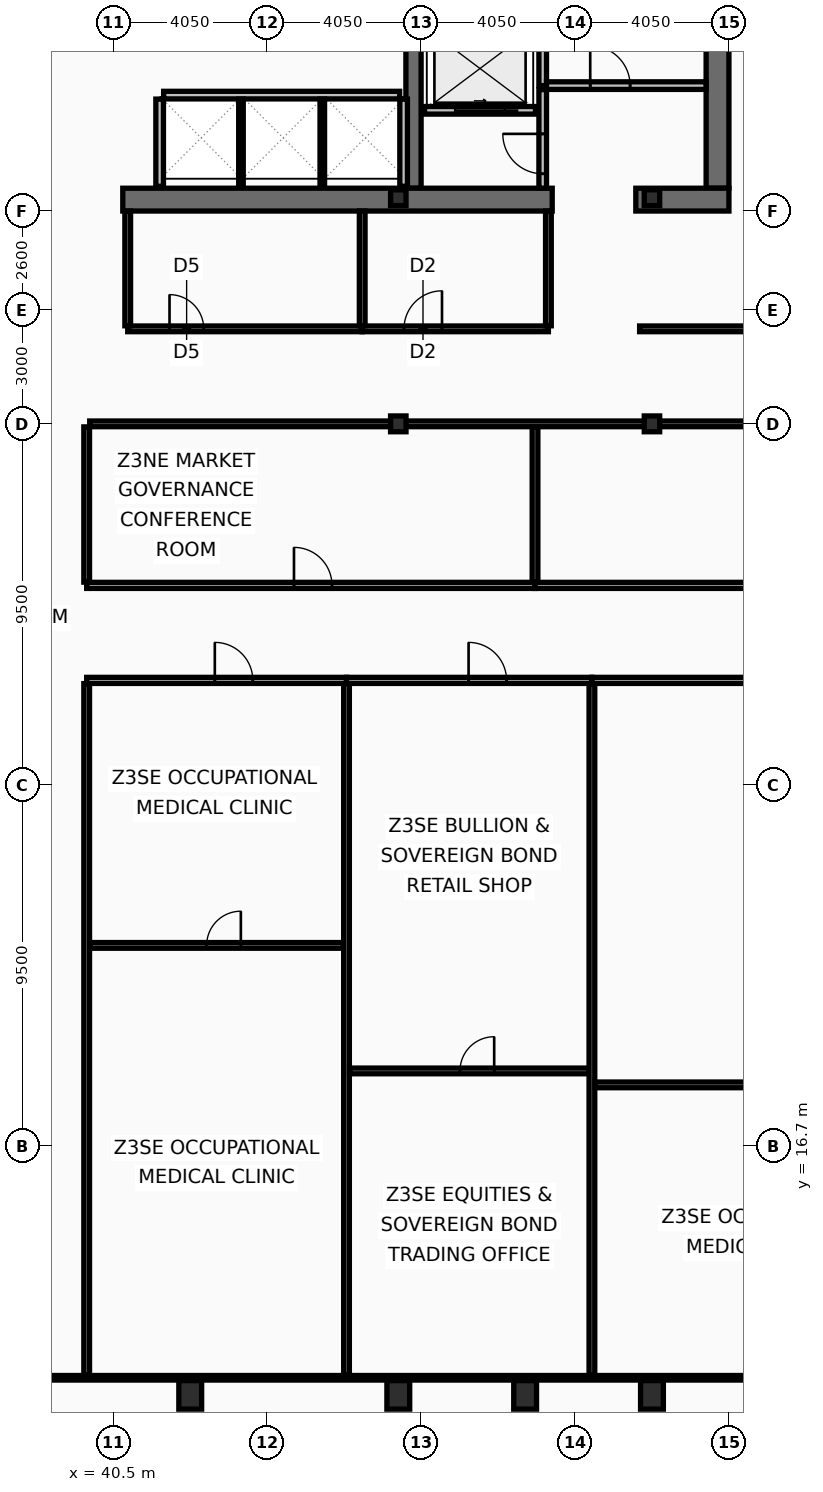
"""IFC4 building model, lengths in metres.
Left out: names, types, materials, properties, quantities, classifications, styles, units other than length and angle.
Written with IfcOpenShell. Run it as: python <this file> out.ifc"""

import sys

from ifc_helpers import new_model, si_unit, direction, frame, frame_2d, origin, origin_2d, place, context, subcontext, project, spatial, rectangle, hollow_rectangle, i_section, extrude, element, fill, save


model = new_model("IFC4")
c1 = context("Model", 3, precision=1e-05, world=origin(), true_north=direction((0.0, 1.0)))
c2 = subcontext(c1, "Body", "Model", "MODEL_VIEW")
j1 = project(units=[si_unit("LENGTHUNIT", "METRE"), si_unit("PLANEANGLEUNIT", "RADIAN")], contexts=[c1])
p1 = place(None, origin())
s1 = spatial("IfcSite", under=j1, at=p1, CompositionType="ELEMENT")
p2 = place(p1, origin())
s2 = spatial("IfcBuilding", under=s1, at=p2, CompositionType="ELEMENT")
p3 = place(p2, frame((0.0, 0.0, 213.8)))
s3 = spatial("IfcBuildingStorey", under=s2, at=p3, CompositionType="ELEMENT", Elevation=213.8)
p4 = place(p3, frame((56.4, 53.1, 0.0), z_axis=(0.0, 0.0, 1.0), x_axis=(0.0, -1.0, 0.0)))
e1 = element("IfcWall", 1, at=p4, inside=s3, PredefinedType="SHEAR", context=c2, shape_type="SweptSolid", body=[
    extrude(rectangle(XDim=11.2, YDim=0.6, at=frame_2d((5.6, 0.0))), origin(), (0.0, 0.0, 1.0), 3.44),
])
p5 = place(p3, frame((48.4, 41.9, 0.0), z_axis=(0.0, 0.0, 1.0), x_axis=(0.0, 1.0, 0.0)))
e2 = element("IfcWall", 2, at=p5, inside=s3, PredefinedType="SHEAR", context=c2, shape_type="SweptSolid", body=[
    extrude(rectangle(XDim=11.2, YDim=0.4, at=frame_2d((5.6, 0.0))), origin(), (0.0, 0.0, 1.0), 3.44),
])
p6 = place(p3, frame((52.05, 41.6, 0.0), z_axis=(0.0, 0.0, 1.0), x_axis=(-1.0, 0.0, 0.0)))
e3 = element("IfcWall", 3, at=p6, inside=s3, PredefinedType="SHEAR", context=c2, shape_type="SweptSolid", body=[
    extrude(rectangle(XDim=11.3, YDim=0.6, at=frame_2d((5.65, 0.0))), origin(), (0.0, 0.0, 1.0), 3.44),
])
p7 = place(p3, frame((56.7, 41.6, 0.0), z_axis=(0.0, 0.0, 1.0), x_axis=(-1.0, 0.0, 0.0)))
e4 = element("IfcWall", 4, at=p7, inside=s3, PredefinedType="SHEAR", context=c2, shape_type="SweptSolid", body=[
    extrude(rectangle(XDim=2.45, YDim=0.6, at=frame_2d((1.225, 0.0))), origin(), (0.0, 0.0, 1.0), 3.44),
])
for number, where, z_axis, x_axis in (
    (5, (42.525, 10.15, 0.0), (0.0, 0.0, 1.0), (1.0, 0.0, 0.0)),
    (6, (48.0, 10.15, 0.0), (0.0, 0.0, 1.0), (1.0, 0.0, 0.0)),
    (7, (51.337, 10.15, 0.0), (0.0, 0.0, 1.0), (1.0, 0.0, 0.0)),
    (8, (54.675, 10.15, 0.0), (0.0, 0.0, 1.0), (1.0, 0.0, 0.0)),
):
    element("IfcColumn", number, at=place(p3, frame(where, z_axis=z_axis, x_axis=x_axis)), inside=s3, PredefinedType="COLUMN", context=c2, shape_type="SweptSolid", body=[
        extrude(hollow_rectangle(XDim=0.6, YDim=0.75, WallThickness=0.045, at=origin_2d()), origin(), (0.0, 0.0, 1.0), 3.6),
    ])
for number, where, z_axis, x_axis in (
    (9, (48.0, 35.7, 0.0), (0.0, 0.0, 1.0), (1.0, 0.0, 0.0)),
    (10, (48.0, 41.65, 0.0), (0.0, 0.0, 1.0), (1.0, 0.0, 0.0)),
    (11, (54.675, 35.7, 0.0), (0.0, 0.0, 1.0), (1.0, 0.0, 0.0)),
    (12, (54.675, 41.65, 0.0), (0.0, 0.0, 1.0), (1.0, 0.0, 0.0)),
):
    element("IfcColumn", number, at=place(p3, frame(where, z_axis=z_axis, x_axis=x_axis)), inside=s3, PredefinedType="COLUMN", context=c2, shape_type="SweptSolid", body=[
        extrude(i_section(OverallWidth=0.406, OverallDepth=0.416, WebThickness=0.03, FlangeThickness=0.048, at=origin_2d()), origin(), (0.0, 0.0, 1.0), 3.6),
    ])
p8 = place(p3, frame((51.61, 43.95, 0.0), z_axis=(0.0, 0.0, 1.0), x_axis=(-1.0, 0.0, 0.0)))
e13 = element("IfcWall", 13, at=p8, inside=s3, PredefinedType="PARTITIONING", context=c2, shape_type="SweptSolid", body=[
    extrude(rectangle(XDim=2.92, YDim=0.2, at=frame_2d((1.46, 0.0))), origin(), (0.0, 0.0, 1.0), 3.44),
])
p9 = place(p8, frame((0.81, 0.0, 0.0)))
e14 = element("IfcOpeningElement", 14, at=p9, cuts=e13, PredefinedType="OPENING", context=c2, shape_type="SweptSolid", body=[
    extrude(rectangle(XDim=1.3, YDim=2.18, at=frame_2d((0.65, 1.09))), frame((0.0, 0.11, 0.0), z_axis=(0.0, -1.0, 0.0), x_axis=(1.0, 0.0, 0.0)), (0.0, 0.0, 1.0), 0.22),
])
p10 = place(p3, frame((51.8, 44.6, 0.0), z_axis=(0.0, 0.0, 1.0), x_axis=(0.0, 1.0, 0.0)))
e15 = element("IfcWall", 15, at=p10, inside=s3, PredefinedType="PARTITIONING", context=c2, shape_type="SweptSolid", body=[
    extrude(rectangle(XDim=4.3, YDim=0.2, at=frame_2d((2.15, 0.0))), origin(), (0.0, 0.0, 1.0), 3.44),
])
p11 = place(p3, frame((51.9, 44.6, 0.0), z_axis=(0.0, 0.0, 1.0), x_axis=(1.0, 0.0, 0.0)))
e16 = element("IfcWall", 16, at=p11, inside=s3, PredefinedType="PARTITIONING", context=c2, shape_type="SweptSolid", body=[
    extrude(rectangle(XDim=4.2, YDim=0.2, at=frame_2d((2.1, 0.0))), origin(), (0.0, 0.0, 1.0), 3.44),
])
p12 = place(p11, frame((1.15, 0.0, 0.0)))
e17 = element("IfcOpeningElement", 17, at=p12, cuts=e16, PredefinedType="OPENING", context=c2, shape_type="SweptSolid", body=[
    extrude(rectangle(XDim=1.05, YDim=2.15, at=frame_2d((0.525, 1.075))), frame((0.0, 0.11, 0.0), z_axis=(0.0, -1.0, 0.0), x_axis=(1.0, 0.0, 0.0)), (0.0, 0.0, 1.0), 0.22),
])
p13 = place(p3, frame((51.8, 41.9, 0.0), z_axis=(0.0, 0.0, 1.0), x_axis=(0.0, 1.0, 0.0)))
e18 = element("IfcWall", 18, at=p13, inside=s3, PredefinedType="PARTITIONING", context=c2, shape_type="SweptSolid", body=[
    extrude(rectangle(XDim=2.595, YDim=0.2, at=frame_2d((1.298, 0.0))), origin(), (0.0, 0.0, 1.0), 3.44),
])
p14 = place(p13, frame((0.38, 0.0, 0.0)))
e19 = element("IfcOpeningElement", 19, at=p14, cuts=e18, PredefinedType="OPENING", context=c2, shape_type="SweptSolid", body=[
    extrude(rectangle(XDim=1.05, YDim=2.15, at=frame_2d((0.525, 1.075))), frame((0.0, 0.11, 0.0), z_axis=(0.0, -1.0, 0.0), x_axis=(1.0, 0.0, 0.0)), (0.0, 0.0, 1.0), 0.22),
])
p15 = place(p3, frame((41.825, 44.35, 0.0), z_axis=(0.0, 0.0, 1.0), x_axis=(1.0, 0.0, 0.0)))
e20 = element("IfcWall", 20, at=p15, inside=s3, PredefinedType="PARTITIONING", context=c2, shape_type="SweptSolid", body=[
    extrude(rectangle(XDim=6.21, YDim=0.2, at=frame_2d((3.105, 0.0))), origin(), (0.0, 0.0, 1.0), 3.44),
])
for number, where, z_axis, x_axis in (
    (21, (41.72, 41.95, 0.0), (0.0, 0.0, 1.0), (0.0, 1.0, 0.0)),
    (22, (48.14, 41.95, 0.0), (0.0, 0.0, 1.0), (0.0, 1.0, 0.0)),
):
    element("IfcWall", number, at=place(p3, frame(where, z_axis=z_axis, x_axis=x_axis)), inside=s3, PredefinedType="PARTITIONING", context=c2, shape_type="SweptSolid", body=[
        extrude(rectangle(XDim=2.295, YDim=0.2, at=frame_2d((1.147, 0.0))), origin(), (0.0, 0.0, 1.0), 3.44),
    ])
for number, where, z_axis, x_axis in (
    (23, (43.86, 41.95, 0.0), (0.0, 0.0, 1.0), (0.0, 1.0, 0.0)),
    (24, (46.0, 41.95, 0.0), (0.0, 0.0, 1.0), (0.0, 1.0, 0.0)),
):
    element("IfcWall", number, at=place(p3, frame(where, z_axis=z_axis, x_axis=x_axis)), inside=s3, PredefinedType="PARTITIONING", context=c2, shape_type="SweptSolid", body=[
        extrude(rectangle(XDim=2.295, YDim=0.12, at=frame_2d((1.147, 0.0))), origin(), (0.0, 0.0, 1.0), 3.44),
    ])
p16 = place(p3, frame((40.88, 38.2, 0.0), z_axis=(0.0, 0.0, 1.0), x_axis=(1.0, 0.0, 0.0)))
e25 = element("IfcWall", 25, at=p16, inside=s3, PredefinedType="PARTITIONING", context=c2, shape_type="SweptSolid", body=[
    extrude(rectangle(XDim=6.17, YDim=0.15, at=frame_2d((3.085, 0.0))), origin(), (0.0, 0.0, 1.0), 2.73),
])
p17 = place(p16, frame((1.1, 0.0, 0.0)))
e26 = element("IfcOpeningElement", 26, at=p17, cuts=e25, PredefinedType="OPENING", context=c2, shape_type="SweptSolid", body=[
    extrude(rectangle(XDim=0.9, YDim=2.05, at=frame_2d((0.45, 1.025))), frame((0.0, 0.085, 0.0), z_axis=(0.0, -1.0, 0.0), x_axis=(1.0, 0.0, 0.0)), (0.0, 0.0, 1.0), 0.17),
])
p18 = place(p3, frame((47.05, 38.2, 0.0), z_axis=(0.0, 0.0, 1.0), x_axis=(1.0, 0.0, 0.0)))
e27 = element("IfcWall", 27, at=p18, inside=s3, PredefinedType="PARTITIONING", context=c2, shape_type="SweptSolid", body=[
    extrude(rectangle(XDim=4.9, YDim=0.15, at=frame_2d((2.45, 0.0))), origin(), (0.0, 0.0, 1.0), 2.73),
])
p19 = place(p18, frame((1.1, 0.0, 0.0)))
e28 = element("IfcOpeningElement", 28, at=p19, cuts=e27, PredefinedType="OPENING", context=c2, shape_type="SweptSolid", body=[
    extrude(rectangle(XDim=1.0, YDim=2.05, at=frame_2d((0.5, 1.025))), frame((0.0, 0.085, 0.0), z_axis=(0.0, -1.0, 0.0), x_axis=(1.0, 0.0, 0.0)), (0.0, 0.0, 1.0), 0.17),
])
for number, where, z_axis, x_axis in (
    (29, (40.88, 38.28, 0.0), (0.0, 0.0, 1.0), (0.0, 1.0, 0.0)),
    (30, (47.05, 38.28, 0.0), (0.0, 0.0, 1.0), (0.0, 1.0, 0.0)),
    (31, (51.95, 38.28, 0.0), (0.0, 0.0, 1.0), (0.0, 1.0, 0.0)),
):
    element("IfcWall", number, at=place(p3, frame(where, z_axis=z_axis, x_axis=x_axis)), inside=s3, PredefinedType="PARTITIONING", context=c2, shape_type="SweptSolid", body=[
        extrude(rectangle(XDim=3.02, YDim=0.15, at=frame_2d((1.51, 0.0))), origin(), (0.0, 0.0, 1.0), 3.44),
    ])
p20 = place(p3, frame((54.35, 38.2, 0.0), z_axis=(0.0, 0.0, 1.0), x_axis=(1.0, 0.0, 0.0)))
e32 = element("IfcWall", 32, at=p20, inside=s3, PredefinedType="PARTITIONING", context=c2, shape_type="SweptSolid", body=[
    extrude(rectangle(XDim=10.52, YDim=0.15, at=frame_2d((5.26, 0.0))), origin(), (0.0, 0.0, 1.0), 2.73),
])
p21 = place(p20, frame((3.25, 0.0, 0.0)))
e33 = element("IfcOpeningElement", 33, at=p21, cuts=e32, PredefinedType="OPENING", context=c2, shape_type="SweptSolid", body=[
    extrude(rectangle(XDim=0.95, YDim=2.05, at=frame_2d((0.475, 1.025))), frame((0.0, 0.085, 0.0), z_axis=(0.0, -1.0, 0.0), x_axis=(1.0, 0.0, 0.0)), (0.0, 0.0, 1.0), 0.17),
])
p22 = place(p3, frame((39.8, 10.665, 0.0), z_axis=(0.0, 0.0, 1.0), x_axis=(0.0, 1.0, 0.0)))
e34 = element("IfcWall", 34, at=p22, inside=s3, PredefinedType="PARTITIONING", context=c2, shape_type="SweptSolid", body=[
    extrude(rectangle(XDim=18.2, YDim=0.15, at=frame_2d((9.1, 0.0))), origin(), (0.0, 0.0, 1.0), 2.98),
])
p23 = place(p3, frame((39.8, 31.535, 0.0), z_axis=(0.0, 0.0, 1.0), x_axis=(0.0, 1.0, 0.0)))
e35 = element("IfcWall", 35, at=p23, inside=s3, PredefinedType="PARTITIONING", context=c2, shape_type="SweptSolid", body=[
    extrude(rectangle(XDim=4.085, YDim=0.15, at=frame_2d((2.042, 0.0))), origin(), (0.0, 0.0, 1.0), 2.98),
])
p24 = place(p3, frame((39.88, 35.7, 0.0), z_axis=(0.0, 0.0, 1.0), x_axis=(1.0, 0.0, 0.0)))
e36 = element("IfcWall", 36, at=p24, inside=s3, PredefinedType="PARTITIONING", context=c2, shape_type="SweptSolid", body=[
    extrude(rectangle(XDim=24.925, YDim=0.15, at=frame_2d((12.462, 0.0))), origin(), (0.0, 0.0, 1.0), 2.73),
])
p25 = place(p3, frame((39.8, 28.95, 0.0), z_axis=(0.0, 0.0, 1.0), x_axis=(1.0, 0.0, 0.0)))
e37 = element("IfcWall", 37, at=p25, inside=s3, PredefinedType="PARTITIONING", context=c2, shape_type="SweptSolid", body=[
    extrude(rectangle(XDim=6.837, YDim=0.16, at=frame_2d((3.418, 0.0))), origin(), (0.0, 0.0, 1.0), 2.73),
])
p26 = place(p25, frame((3.372, 0.0, 0.0)))
e38 = element("IfcOpeningElement", 38, at=p26, cuts=e37, PredefinedType="OPENING", context=c2, shape_type="SweptSolid", body=[
    extrude(rectangle(XDim=1.0, YDim=2.05, at=frame_2d((0.5, 1.025))), frame((0.0, 0.09, 0.0), z_axis=(0.0, -1.0, 0.0), x_axis=(1.0, 0.0, 0.0)), (0.0, 0.0, 1.0), 0.18),
])
p27 = place(p3, frame((39.88, 21.977, 0.0), z_axis=(0.0, 0.0, 1.0), x_axis=(1.0, 0.0, 0.0)))
e39 = element("IfcWall", 39, at=p27, inside=s3, PredefinedType="PARTITIONING", context=c2, shape_type="SweptSolid", body=[
    extrude(rectangle(XDim=6.677, YDim=0.15, at=frame_2d((3.339, 0.0))), origin(), (0.0, 0.0, 1.0), 2.73),
])
p28 = place(p27, frame((3.077, 0.0, 0.0)))
e40 = element("IfcOpeningElement", 40, at=p28, cuts=e39, PredefinedType="OPENING", context=c2, shape_type="SweptSolid", body=[
    extrude(rectangle(XDim=0.9, YDim=2.05, at=frame_2d((0.45, 1.025))), frame((0.0, 0.085, 0.0), z_axis=(0.0, -1.0, 0.0), x_axis=(1.0, 0.0, 0.0)), (0.0, 0.0, 1.0), 0.17),
])
p29 = place(p3, frame((46.637, 28.95, 0.0), z_axis=(0.0, 0.0, 1.0), x_axis=(1.0, 0.0, 0.0)))
e41 = element("IfcWall", 41, at=p29, inside=s3, PredefinedType="PARTITIONING", context=c2, shape_type="SweptSolid", body=[
    extrude(rectangle(XDim=6.458, YDim=0.16, at=frame_2d((3.229, 0.0))), origin(), (0.0, 0.0, 1.0), 2.73),
])
p30 = place(p29, frame((3.212, 0.0, 0.0)))
e42 = element("IfcOpeningElement", 42, at=p30, cuts=e41, PredefinedType="OPENING", context=c2, shape_type="SweptSolid", body=[
    extrude(rectangle(XDim=1.0, YDim=2.05, at=frame_2d((0.5, 1.025))), frame((0.0, 0.09, 0.0), z_axis=(0.0, -1.0, 0.0), x_axis=(1.0, 0.0, 0.0)), (0.0, 0.0, 1.0), 0.18),
])
p31 = place(p3, frame((46.637, 10.665, 0.0), z_axis=(0.0, 0.0, 1.0), x_axis=(0.0, 1.0, 0.0)))
e43 = element("IfcWall", 43, at=p31, inside=s3, PredefinedType="PARTITIONING", context=c2, shape_type="SweptSolid", body=[
    extrude(rectangle(XDim=18.2, YDim=0.15, at=frame_2d((9.1, 0.0))), origin(), (0.0, 0.0, 1.0), 2.98),
])
p32 = place(p3, frame((46.717, 18.674, 0.0), z_axis=(0.0, 0.0, 1.0), x_axis=(1.0, 0.0, 0.0)))
e44 = element("IfcWall", 44, at=p32, inside=s3, PredefinedType="PARTITIONING", context=c2, shape_type="SweptSolid", body=[
    extrude(rectangle(XDim=6.297, YDim=0.15, at=frame_2d((3.149, 0.0))), origin(), (0.0, 0.0, 1.0), 2.73),
])
p33 = place(p32, frame((2.906, 0.0, 0.0)))
e45 = element("IfcOpeningElement", 45, at=p33, cuts=e44, PredefinedType="OPENING", context=c2, shape_type="SweptSolid", body=[
    extrude(rectangle(XDim=0.9, YDim=2.05, at=frame_2d((0.45, 1.025))), frame((0.0, 0.085, 0.0), z_axis=(0.0, -1.0, 0.0), x_axis=(1.0, 0.0, 0.0)), (0.0, 0.0, 1.0), 0.17),
])
p34 = place(p3, frame((53.095, 28.95, 0.0), z_axis=(0.0, 0.0, 1.0), x_axis=(1.0, 0.0, 0.0)))
e46 = element("IfcWall", 46, at=p34, inside=s3, PredefinedType="PARTITIONING", context=c2, shape_type="SweptSolid", body=[
    extrude(rectangle(XDim=11.775, YDim=0.16, at=frame_2d((5.888, 0.0))), origin(), (0.0, 0.0, 1.0), 2.73),
])
p35 = place(p34, frame((5.446, 0.0, 0.0)))
e47 = element("IfcOpeningElement", 47, at=p35, cuts=e46, PredefinedType="OPENING", context=c2, shape_type="SweptSolid", body=[
    extrude(rectangle(XDim=1.0, YDim=2.05, at=frame_2d((0.5, 1.025))), frame((0.0, 0.09, 0.0), z_axis=(0.0, -1.0, 0.0), x_axis=(1.0, 0.0, 0.0)), (0.0, 0.0, 1.0), 0.18),
])
p36 = place(p3, frame((53.095, 10.665, 0.0), z_axis=(0.0, 0.0, 1.0), x_axis=(0.0, 1.0, 0.0)))
e48 = element("IfcWall", 48, at=p36, inside=s3, PredefinedType="PARTITIONING", context=c2, shape_type="SweptSolid", body=[
    extrude(rectangle(XDim=18.2, YDim=0.15, at=frame_2d((9.1, 0.0))), origin(), (0.0, 0.0, 1.0), 2.98),
])
p37 = place(p3, frame((53.175, 18.307, 0.0), z_axis=(0.0, 0.0, 1.0), x_axis=(1.0, 0.0, 0.0)))
e49 = element("IfcWall", 49, at=p37, inside=s3, PredefinedType="PARTITIONING", context=c2, shape_type="SweptSolid", body=[
    extrude(rectangle(XDim=11.63, YDim=0.15, at=frame_2d((5.815, 0.0))), origin(), (0.0, 0.0, 1.0), 2.73),
])
p38 = place(p37, frame((5.299, 0.0, 0.0)))
e50 = element("IfcOpeningElement", 50, at=p38, cuts=e49, PredefinedType="OPENING", context=c2, shape_type="SweptSolid", body=[
    extrude(rectangle(XDim=0.9, YDim=2.05, at=frame_2d((0.45, 1.025))), frame((0.0, 0.085, 0.0), z_axis=(0.0, -1.0, 0.0), x_axis=(1.0, 0.0, 0.0)), (0.0, 0.0, 1.0), 0.17),
])
p39 = place(p3, frame((39.8, 31.45, 0.0), z_axis=(0.0, 0.0, 1.0), x_axis=(1.0, 0.0, 0.0)))
e51 = element("IfcWall", 51, at=p39, inside=s3, PredefinedType="PARTITIONING", context=c2, shape_type="SweptSolid", body=[
    extrude(rectangle(XDim=11.798, YDim=0.16, at=frame_2d((5.899, 0.0))), origin(), (0.0, 0.0, 1.0), 2.73),
])
p40 = place(p39, frame((5.455, 0.0, 0.0)))
e52 = element("IfcOpeningElement", 52, at=p40, cuts=e51, PredefinedType="OPENING", context=c2, shape_type="SweptSolid", body=[
    extrude(rectangle(XDim=1.0, YDim=2.05, at=frame_2d((0.5, 1.025))), frame((0.0, 0.09, 0.0), z_axis=(0.0, -1.0, 0.0), x_axis=(1.0, 0.0, 0.0)), (0.0, 0.0, 1.0), 0.18),
])
p41 = place(p3, frame((51.598, 31.45, 0.0), z_axis=(0.0, 0.0, 1.0), x_axis=(1.0, 0.0, 0.0)))
e53 = element("IfcWall", 53, at=p41, inside=s3, PredefinedType="PARTITIONING", context=c2, shape_type="SweptSolid", body=[
    extrude(rectangle(XDim=13.272, YDim=0.16, at=frame_2d((6.636, 0.0))), origin(), (0.0, 0.0, 1.0), 2.73),
])
p42 = place(p41, frame((6.074, 0.0, 0.0)))
e54 = element("IfcOpeningElement", 54, at=p42, cuts=e53, PredefinedType="OPENING", context=c2, shape_type="SweptSolid", body=[
    extrude(rectangle(XDim=1.0, YDim=2.05, at=frame_2d((0.5, 1.025))), frame((0.0, 0.09, 0.0), z_axis=(0.0, -1.0, 0.0), x_axis=(1.0, 0.0, 0.0)), (0.0, 0.0, 1.0), 0.18),
])
p43 = place(p3, frame((51.598, 31.535, 0.0), z_axis=(0.0, 0.0, 1.0), x_axis=(0.0, 1.0, 0.0)))
e55 = element("IfcWall", 55, at=p43, inside=s3, PredefinedType="PARTITIONING", context=c2, shape_type="SweptSolid", body=[
    extrude(rectangle(XDim=4.085, YDim=0.15, at=frame_2d((2.042, 0.0))), origin(), (0.0, 0.0, 1.0), 2.98),
])
p44 = place(p3, frame((8.095, 10.6, 0.0), z_axis=(0.0, 0.0, 1.0), x_axis=(1.0, 0.0, 0.0)))
e56 = element("IfcWall", 56, at=p44, inside=s3, PredefinedType="PARTITIONING", context=c2, shape_type="SweptSolid", body=[
    extrude(rectangle(XDim=56.71, YDim=0.12, at=frame_2d((28.355, 0.0))), origin(), (0.0, 0.0, 1.0), 2.73),
])
p45 = place(p9, origin())
e57 = element("IfcDoor", 57, at=p45, inside=s3, OperationType="SLIDING_TO_LEFT", PredefinedType="DOOR", context=c2, shape_type="SweptSolid", body=[
    extrude(rectangle(XDim=1.3, YDim=2.18, at=frame_2d((0.65, 1.09))), frame((0.0, 0.025, 0.0), z_axis=(0.0, -1.0, 0.0), x_axis=(1.0, 0.0, 0.0)), (0.0, 0.0, 1.0), 0.05),
])
fill(e14, e57)
p46 = place(p12, origin())
e58 = element("IfcDoor", 58, at=p46, inside=s3, OperationType="SINGLE_SWING_LEFT", PredefinedType="DOOR", context=c2, shape_type="SweptSolid", body=[
    extrude(rectangle(XDim=1.05, YDim=2.15, at=frame_2d((0.525, 1.075))), frame((0.0, 0.025, 0.0), z_axis=(0.0, -1.0, 0.0), x_axis=(1.0, 0.0, 0.0)), (0.0, 0.0, 1.0), 0.05),
])
fill(e17, e58)
p47 = place(p14, origin())
e59 = element("IfcDoor", 59, at=p47, inside=s3, OperationType="SINGLE_SWING_RIGHT", PredefinedType="DOOR", context=c2, shape_type="SweptSolid", body=[
    extrude(rectangle(XDim=1.05, YDim=2.15, at=frame_2d((0.525, 1.075))), frame((0.0, 0.025, 0.0), z_axis=(0.0, -1.0, 0.0), x_axis=(1.0, 0.0, 0.0)), (0.0, 0.0, 1.0), 0.05),
])
fill(e19, e59)
p48 = place(p17, origin())
e60 = element("IfcDoor", 60, at=p48, inside=s3, OperationType="SINGLE_SWING_LEFT", PredefinedType="DOOR", context=c2, shape_type="SweptSolid", body=[
    extrude(rectangle(XDim=0.9, YDim=2.05, at=frame_2d((0.45, 1.025))), frame((0.0, 0.025, 0.0), z_axis=(0.0, -1.0, 0.0), x_axis=(1.0, 0.0, 0.0)), (0.0, 0.0, 1.0), 0.05),
])
fill(e26, e60)
p49 = place(p19, origin())
e61 = element("IfcDoor", 61, at=p49, inside=s3, OperationType="SINGLE_SWING_RIGHT", PredefinedType="DOOR", context=c2, shape_type="SweptSolid", body=[
    extrude(rectangle(XDim=1.0, YDim=2.05, at=frame_2d((0.5, 1.025))), frame((0.0, 0.025, 0.0), z_axis=(0.0, -1.0, 0.0), x_axis=(1.0, 0.0, 0.0)), (0.0, 0.0, 1.0), 0.05),
])
fill(e28, e61)
p50 = place(p26, origin())
e62 = element("IfcDoor", 62, at=p50, inside=s3, OperationType="SINGLE_SWING_LEFT", PredefinedType="DOOR", context=c2, shape_type="SweptSolid", body=[
    extrude(rectangle(XDim=1.0, YDim=2.05, at=frame_2d((0.5, 1.025))), frame((0.0, 0.025, 0.0), z_axis=(0.0, -1.0, 0.0), x_axis=(1.0, 0.0, 0.0)), (0.0, 0.0, 1.0), 0.05),
])
fill(e38, e62)
p51 = place(p28, origin())
e63 = element("IfcDoor", 63, at=p51, inside=s3, OperationType="SINGLE_SWING_RIGHT", PredefinedType="DOOR", context=c2, shape_type="SweptSolid", body=[
    extrude(rectangle(XDim=0.9, YDim=2.05, at=frame_2d((0.45, 1.025))), frame((0.0, 0.025, 0.0), z_axis=(0.0, -1.0, 0.0), x_axis=(1.0, 0.0, 0.0)), (0.0, 0.0, 1.0), 0.05),
])
fill(e40, e63)
p52 = place(p30, origin())
e64 = element("IfcDoor", 64, at=p52, inside=s3, OperationType="SINGLE_SWING_LEFT", PredefinedType="DOOR", context=c2, shape_type="SweptSolid", body=[
    extrude(rectangle(XDim=1.0, YDim=2.05, at=frame_2d((0.5, 1.025))), frame((0.0, 0.025, 0.0), z_axis=(0.0, -1.0, 0.0), x_axis=(1.0, 0.0, 0.0)), (0.0, 0.0, 1.0), 0.05),
])
fill(e42, e64)
p53 = place(p33, origin())
e65 = element("IfcDoor", 65, at=p53, inside=s3, OperationType="SINGLE_SWING_RIGHT", PredefinedType="DOOR", context=c2, shape_type="SweptSolid", body=[
    extrude(rectangle(XDim=0.9, YDim=2.05, at=frame_2d((0.45, 1.025))), frame((0.0, 0.025, 0.0), z_axis=(0.0, -1.0, 0.0), x_axis=(1.0, 0.0, 0.0)), (0.0, 0.0, 1.0), 0.05),
])
fill(e45, e65)
p54 = place(p40, origin())
e66 = element("IfcDoor", 66, at=p54, inside=s3, OperationType="SINGLE_SWING_LEFT", PredefinedType="DOOR", context=c2, shape_type="SweptSolid", body=[
    extrude(rectangle(XDim=1.0, YDim=2.05, at=frame_2d((0.5, 1.025))), frame((0.0, 0.025, 0.0), z_axis=(0.0, -1.0, 0.0), x_axis=(1.0, 0.0, 0.0)), (0.0, 0.0, 1.0), 0.05),
])
fill(e52, e66)
save(model, sys.argv[1])
